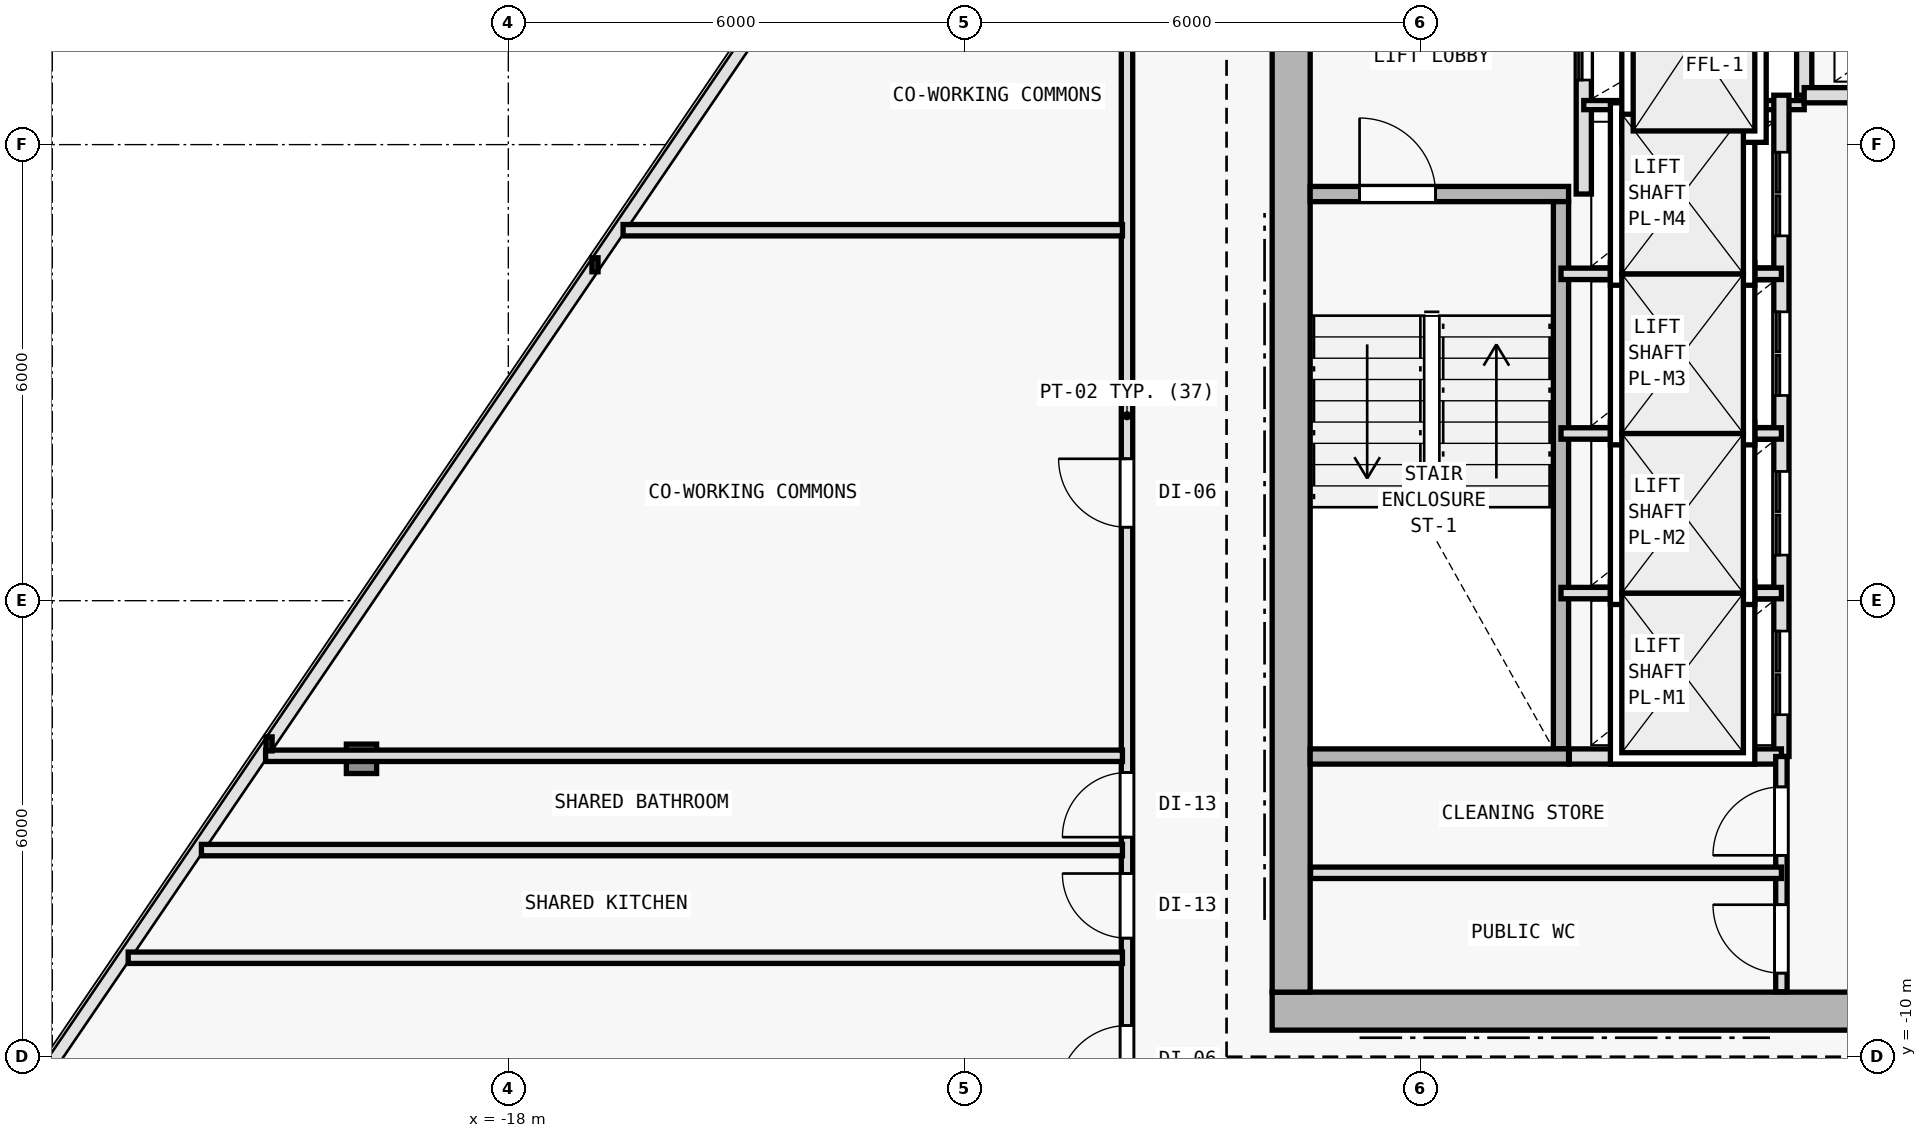
"""IFC4 building model, lengths in metres.
Left out: names, types, materials, properties, quantities, classifications, styles, units other than length and angle.
Written with IfcOpenShell. Run it as: python <this file> out.ifc"""

import sys

from ifc_helpers import new_model, si_unit, direction, frame, frame_2d, origin, origin_2d, place, context, subcontext, project, spatial, rectangle, i_section, extrude, element, fill, save


model = new_model("IFC4")
c1 = context("Model", 3, precision=1e-05, world=origin(), true_north=direction((0.0, 1.0)))
c2 = subcontext(c1, "Body", "Model", "MODEL_VIEW")
j1 = project(units=[si_unit("LENGTHUNIT", "METRE"), si_unit("PLANEANGLEUNIT", "RADIAN")], contexts=[c1])
p1 = place(None, origin())
s1 = spatial("IfcSite", under=j1, at=p1, CompositionType="ELEMENT")
p2 = place(p1, origin())
s2 = spatial("IfcBuilding", under=s1, at=p2, CompositionType="ELEMENT")
p3 = place(p2, frame((0.0, 0.0, 209.1)))
s3 = spatial("IfcBuildingStorey", under=s2, at=p3, CompositionType="ELEMENT", Elevation=209.1)
for number, where, z_axis, x_axis in (
    (1, (-7.7, -9.4, 0.0), (0.0, 0.0, 1.0), (1.0, 0.0, 0.0)),
    (2, (-7.7, 2.0, 0.0), (0.0, 0.0, 1.0), (1.0, 0.0, 0.0)),
):
    element("IfcColumn", number, at=place(p3, frame(where, z_axis=z_axis, x_axis=x_axis)), inside=s3, PredefinedType="COLUMN", context=c2, shape_type="SweptSolid", body=[
        extrude(i_section(OverallWidth=0.398, OverallDepth=0.387, WebThickness=0.013, FlangeThickness=0.022, FilletRadius=0.015, at=origin_2d()), origin(), (0.0, 0.0, 1.0), 3.6),
    ])
p4 = place(p3, frame((-19.932, -6.08, 0.005), z_axis=(0.02590150246, 0.022230423371, 0.999417290448), x_axis=(-0.65128330188, 0.758834672832, 0.0)))
e3 = element("IfcColumn", 3, at=p4, inside=s3, PredefinedType="COLUMN", context=c2, shape_type="SweptSolid", body=[
    extrude(i_section(OverallWidth=0.398, OverallDepth=0.387, WebThickness=0.013, FlangeThickness=0.022, FilletRadius=0.015, at=origin_2d()), origin(), (0.0, 0.0, 1.0), 3.591),
])
p5 = place(p3, frame((-7.95, -9.4, 0.0), z_axis=(0.0, 0.0, 1.0), x_axis=(1.0, 0.0, 0.0)))
e4 = element("IfcWall", 4, at=p5, inside=s3, PredefinedType="SHEAR", context=c2, shape_type="SweptSolid", body=[
    extrude(rectangle(XDim=15.9, YDim=0.5, at=frame_2d((7.95, 0.0))), origin(), (0.0, 0.0, 1.0), 3.35),
])
p6 = place(p5, frame((9.6, 0.0, 0.0)))
e5 = element("IfcOpeningElement", 5, at=p6, cuts=e4, PredefinedType="OPENING", context=c2, shape_type="SweptSolid", body=[
    extrude(rectangle(XDim=1.5, YDim=2.2, at=frame_2d((0.75, 1.1))), frame((0.0, 0.26, 0.0), z_axis=(0.0, -1.0, 0.0), x_axis=(1.0, 0.0, 0.0)), (0.0, 0.0, 1.0), 0.52),
])
p7 = place(p3, frame((-7.7, -9.15, 0.0), z_axis=(0.0, 0.0, 1.0), x_axis=(0.0, 1.0, 0.0)))
e6 = element("IfcWall", 6, at=p7, inside=s3, PredefinedType="SHEAR", context=c2, shape_type="SweptSolid", body=[
    extrude(rectangle(XDim=19.1, YDim=0.5, at=frame_2d((9.55, 0.0))), origin(), (0.0, 0.0, 1.0), 3.35),
])
p8 = place(p7, frame((12.7, 0.0, 0.0)))
e7 = element("IfcOpeningElement", 7, at=p8, cuts=e6, PredefinedType="OPENING", context=c2, shape_type="SweptSolid", body=[
    extrude(rectangle(XDim=1.1, YDim=2.15, at=frame_2d((0.55, 1.075))), frame((0.0, 0.26, 0.0), z_axis=(0.0, -1.0, 0.0), x_axis=(1.0, 0.0, 0.0)), (0.0, 0.0, 1.0), 0.52),
])
p9 = place(p3, frame((-7.45, 1.35, 0.0), z_axis=(0.0, 0.0, 1.0), x_axis=(1.0, 0.0, 0.0)))
e8 = element("IfcWall", 8, at=p9, inside=s3, PredefinedType="SOLIDWALL", context=c2, shape_type="SweptSolid", body=[
    extrude(rectangle(XDim=3.4, YDim=0.2, at=frame_2d((1.7, 0.0))), origin(), (0.0, 0.0, 1.0), 3.35),
])
p10 = place(p9, frame((0.65, 0.0, 0.0)))
e9 = element("IfcOpeningElement", 9, at=p10, cuts=e8, PredefinedType="OPENING", context=c2, shape_type="SweptSolid", body=[
    extrude(rectangle(XDim=1.0, YDim=2.15, at=frame_2d((0.5, 1.075))), frame((0.0, 0.11, 0.0), z_axis=(0.0, -1.0, 0.0), x_axis=(1.0, 0.0, 0.0)), (0.0, 0.0, 1.0), 0.22),
])
p11 = place(p3, frame((-4.15, -5.95, 0.0), z_axis=(0.0, 0.0, 1.0), x_axis=(0.0, 1.0, 0.0)))
e10 = element("IfcWall", 10, at=p11, inside=s3, PredefinedType="SOLIDWALL", context=c2, shape_type="SweptSolid", body=[
    extrude(rectangle(XDim=7.2, YDim=0.2, at=frame_2d((3.6, 0.0))), origin(), (0.0, 0.0, 1.0), 3.35),
])
p12 = place(p3, frame((-3.85, 1.35, 0.0), z_axis=(0.0, 0.0, 1.0), x_axis=(0.0, 1.0, 0.0)))
e11 = element("IfcWall", 11, at=p12, inside=s3, PredefinedType="SOLIDWALL", context=c2, shape_type="SweptSolid", body=[
    extrude(rectangle(XDim=8.595, YDim=0.2, at=frame_2d((4.297, 0.0))), origin(), (0.0, 0.0, 1.0), 3.35),
])
p13 = place(p12, frame((1.5, 0.0, 0.0)))
e12 = element("IfcOpeningElement", 12, at=p13, cuts=e11, PredefinedType="OPENING", context=c2, shape_type="SweptSolid", body=[
    extrude(rectangle(XDim=1.0, YDim=2.15, at=frame_2d((0.5, 1.075))), frame((0.0, 0.11, 0.0), z_axis=(0.0, -1.0, 0.0), x_axis=(1.0, 0.0, 0.0)), (0.0, 0.0, 1.0), 0.22),
])
p14 = place(p12, frame((3.18, 0.0, 0.0)))
e13 = element("IfcOpeningElement", 13, at=p14, cuts=e11, PredefinedType="OPENING", context=c2, shape_type="SweptSolid", body=[
    extrude(rectangle(XDim=1.0, YDim=2.15, at=frame_2d((0.5, 1.075))), frame((0.0, 0.11, 0.0), z_axis=(0.0, -1.0, 0.0), x_axis=(1.0, 0.0, 0.0)), (0.0, 0.0, 1.0), 0.22),
])
p15 = place(p3, frame((-0.95, 2.65, 0.0), z_axis=(0.0, 0.0, 1.0), x_axis=(0.0, 1.0, 0.0)))
e14 = element("IfcWall", 14, at=p15, inside=s3, PredefinedType="SOLIDWALL", context=c2, shape_type="SweptSolid", body=[
    extrude(rectangle(XDim=3.27, YDim=0.2, at=frame_2d((1.635, 0.0))), origin(), (0.0, 0.0, 1.0), 3.35),
])
p16 = place(p3, frame((-3.85, 2.52, 0.0), z_axis=(0.0, 0.0, 1.0), x_axis=(1.0, 0.0, 0.0)))
e15 = element("IfcWall", 15, at=p16, inside=s3, PredefinedType="PARTITIONING", context=c2, shape_type="SweptSolid", body=[
    extrude(rectangle(XDim=2.9, YDim=0.12, at=frame_2d((1.45, 0.0))), origin(), (0.0, 0.0, 1.0), 3.35),
])
p17 = place(p3, frame((-1.25, -6.05, 0.0), z_axis=(0.0, 0.0, 1.0), x_axis=(0.0, 1.0, 0.0)))
e16 = element("IfcWall", 16, at=p17, inside=s3, PredefinedType="SOLIDWALL", context=c2, shape_type="SweptSolid", body=[
    extrude(rectangle(XDim=8.7, YDim=0.2, at=frame_2d((4.35, 0.0))), origin(), (0.0, 0.0, 1.0), 3.35),
])
p18 = place(p17, frame((0.55, 0.0, 0.0)))
e17 = element("IfcOpeningElement", 17, at=p18, cuts=e16, PredefinedType="OPENING", context=c2, shape_type="SweptSolid", body=[
    extrude(rectangle(XDim=1.1, YDim=2.15, at=frame_2d((0.55, 1.075))), frame((0.0, 0.11, 0.0), z_axis=(0.0, -1.0, 0.0), x_axis=(1.0, 0.0, 0.0)), (0.0, 0.0, 1.0), 0.22),
])
p19 = place(p17, frame((2.65, 0.0, 0.0)))
e18 = element("IfcOpeningElement", 18, at=p19, cuts=e16, PredefinedType="OPENING", context=c2, shape_type="SweptSolid", body=[
    extrude(rectangle(XDim=1.1, YDim=2.15, at=frame_2d((0.55, 1.075))), frame((0.0, 0.11, 0.0), z_axis=(0.0, -1.0, 0.0), x_axis=(1.0, 0.0, 0.0)), (0.0, 0.0, 1.0), 0.22),
])
p20 = place(p17, frame((4.75, 0.0, 0.0)))
e19 = element("IfcOpeningElement", 19, at=p20, cuts=e16, PredefinedType="OPENING", context=c2, shape_type="SweptSolid", body=[
    extrude(rectangle(XDim=1.1, YDim=2.15, at=frame_2d((0.55, 1.075))), frame((0.0, 0.11, 0.0), z_axis=(0.0, -1.0, 0.0), x_axis=(1.0, 0.0, 0.0)), (0.0, 0.0, 1.0), 0.22),
])
p21 = place(p17, frame((6.85, 0.0, 0.0)))
e20 = element("IfcOpeningElement", 20, at=p21, cuts=e16, PredefinedType="OPENING", context=c2, shape_type="SweptSolid", body=[
    extrude(rectangle(XDim=1.1, YDim=2.15, at=frame_2d((0.55, 1.075))), frame((0.0, 0.11, 0.0), z_axis=(0.0, -1.0, 0.0), x_axis=(1.0, 0.0, 0.0)), (0.0, 0.0, 1.0), 0.22),
])
for number, where, z_axis, x_axis in (
    (21, (-4.15, -3.9, 0.0), (0.0, 0.0, 1.0), (1.0, 0.0, 0.0)),
    (22, (-4.15, -1.8, 0.0), (0.0, 0.0, 1.0), (1.0, 0.0, 0.0)),
    (23, (-4.15, 0.3, 0.0), (0.0, 0.0, 1.0), (1.0, 0.0, 0.0)),
):
    element("IfcWall", number, at=place(p3, frame(where, z_axis=z_axis, x_axis=x_axis)), inside=s3, PredefinedType="PARTITIONING", context=c2, shape_type="SweptSolid", body=[
        extrude(rectangle(XDim=2.9, YDim=0.15, at=frame_2d((1.45, 0.0))), origin(), (0.0, 0.0, 1.0), 3.35),
    ])
p22 = place(p3, frame((-0.95, 2.65, 0.0), z_axis=(0.0, 0.0, 1.0), x_axis=(1.0, 0.0, 0.0)))
e24 = element("IfcWall", 24, at=p22, inside=s3, PredefinedType="SOLIDWALL", context=c2, shape_type="SweptSolid", body=[
    extrude(rectangle(XDim=2.9, YDim=0.2, at=frame_2d((1.45, 0.0))), origin(), (0.0, 0.0, 1.0), 3.35),
])
p23 = place(p3, frame((-7.45, -6.05, 0.0), z_axis=(0.0, 0.0, 1.0), x_axis=(1.0, 0.0, 0.0)))
e25 = element("IfcWall", 25, at=p23, inside=s3, PredefinedType="SOLIDWALL", context=c2, shape_type="SweptSolid", body=[
    extrude(rectangle(XDim=3.4, YDim=0.2, at=frame_2d((1.7, 0.0))), origin(), (0.0, 0.0, 1.0), 3.35),
])
p24 = place(p3, frame((-4.04, -6.05, 0.0), z_axis=(0.0, 0.0, 1.0), x_axis=(1.0, 0.0, 0.0)))
e26 = element("IfcWall", 26, at=p24, inside=s3, PredefinedType="SOLIDWALL", context=c2, shape_type="SweptSolid", body=[
    extrude(rectangle(XDim=2.79, YDim=0.2, at=frame_2d((1.395, 0.0))), origin(), (0.0, 0.0, 1.0), 3.35),
])
p25 = place(p3, frame((-1.25, -9.145, 0.0), z_axis=(0.0, 0.0, 1.0), x_axis=(0.0, 1.0, 0.0)))
e27 = element("IfcWall", 27, at=p25, inside=s3, PredefinedType="PARTITIONING", context=c2, shape_type="SweptSolid", body=[
    extrude(rectangle(XDim=3.095, YDim=0.15, at=frame_2d((1.547, 0.0))), origin(), (0.0, 0.0, 1.0), 3.35),
])
p26 = place(p25, frame((1.795, 0.0, 0.0)))
e28 = element("IfcOpeningElement", 28, at=p26, cuts=e27, PredefinedType="OPENING", context=c2, shape_type="SweptSolid", body=[
    extrude(rectangle(XDim=0.9, YDim=2.1, at=frame_2d((0.45, 1.05))), frame((0.0, 0.085, 0.0), z_axis=(0.0, -1.0, 0.0), x_axis=(1.0, 0.0, 0.0)), (0.0, 0.0, 1.0), 0.17),
])
p27 = place(p25, frame((0.245, 0.0, 0.0)))
e29 = element("IfcOpeningElement", 29, at=p27, cuts=e27, PredefinedType="OPENING", context=c2, shape_type="SweptSolid", body=[
    extrude(rectangle(XDim=0.9, YDim=2.1, at=frame_2d((0.45, 1.05))), frame((0.0, 0.085, 0.0), z_axis=(0.0, -1.0, 0.0), x_axis=(1.0, 0.0, 0.0)), (0.0, 0.0, 1.0), 0.17),
])
p28 = place(p3, frame((-7.445, -7.58, 0.0), z_axis=(0.0, 0.0, 1.0), x_axis=(1.0, 0.0, 0.0)))
e30 = element("IfcWall", 30, at=p28, inside=s3, PredefinedType="PARTITIONING", context=c2, shape_type="SweptSolid", body=[
    extrude(rectangle(XDim=6.195, YDim=0.15, at=frame_2d((3.098, 0.0))), origin(), (0.0, 0.0, 1.0), 3.35),
])
p29 = place(p3, frame((-9.86, -11.56, 0.0), z_axis=(0.0, 0.0, 1.0), x_axis=(0.0, 1.0, 0.0)))
e31 = element("IfcWall", 31, at=p29, inside=s3, PredefinedType="PARTITIONING", context=c2, shape_type="SweptSolid", body=[
    extrude(rectangle(XDim=19.986, YDim=0.15, at=frame_2d((9.993, 0.0))), origin(), (0.0, 0.0, 1.0), 2.825),
])
p30 = place(p29, frame((8.527, 0.0, 0.0)))
e32 = element("IfcOpeningElement", 32, at=p30, cuts=e31, PredefinedType="OPENING", context=c2, shape_type="SweptSolid", body=[
    extrude(rectangle(XDim=0.9, YDim=2.1, at=frame_2d((0.45, 1.05))), frame((0.0, 0.085, 0.0), z_axis=(0.0, -1.0, 0.0), x_axis=(1.0, 0.0, 0.0)), (0.0, 0.0, 1.0), 0.17),
])
p31 = place(p29, frame((4.449, 0.0, 0.0)))
e33 = element("IfcOpeningElement", 33, at=p31, cuts=e31, PredefinedType="OPENING", context=c2, shape_type="SweptSolid", body=[
    extrude(rectangle(XDim=0.85, YDim=2.1, at=frame_2d((0.425, 1.05))), frame((0.0, 0.085, 0.0), z_axis=(0.0, -1.0, 0.0), x_axis=(1.0, 0.0, 0.0)), (0.0, 0.0, 1.0), 0.17),
])
p32 = place(p29, frame((3.121, 0.0, 0.0)))
e34 = element("IfcOpeningElement", 34, at=p32, cuts=e31, PredefinedType="OPENING", context=c2, shape_type="SweptSolid", body=[
    extrude(rectangle(XDim=0.85, YDim=2.1, at=frame_2d((0.425, 1.05))), frame((0.0, 0.085, 0.0), z_axis=(0.0, -1.0, 0.0), x_axis=(1.0, 0.0, 0.0)), (0.0, 0.0, 1.0), 0.17),
])
p33 = place(p29, frame((1.07, 0.0, 0.0)))
e35 = element("IfcOpeningElement", 35, at=p33, cuts=e31, PredefinedType="OPENING", context=c2, shape_type="SweptSolid", body=[
    extrude(rectangle(XDim=0.9, YDim=2.1, at=frame_2d((0.45, 1.05))), frame((0.0, 0.085, 0.0), z_axis=(0.0, -1.0, 0.0), x_axis=(1.0, 0.0, 0.0)), (0.0, 0.0, 1.0), 0.17),
])
p34 = place(p29, frame((15.671, 0.0, 0.0)))
e36 = element("IfcOpeningElement", 36, at=p34, cuts=e31, PredefinedType="OPENING", context=c2, shape_type="SweptSolid", body=[
    extrude(rectangle(XDim=0.9, YDim=2.1, at=frame_2d((0.45, 1.05))), frame((0.0, 0.085, 0.0), z_axis=(0.0, -1.0, 0.0), x_axis=(1.0, 0.0, 0.0)), (0.0, 0.0, 1.0), 0.17),
])
p35 = place(p3, frame((-9.92, -6.041, 0.0), z_axis=(0.0, 0.0, 1.0), x_axis=(-1.0, 0.0, 0.0)))
e37 = element("IfcWall", 37, at=p35, inside=s3, PredefinedType="PARTITIONING", context=c2, shape_type="SweptSolid", body=[
    extrude(rectangle(XDim=11.274, YDim=0.15, at=frame_2d((5.637, 0.0))), origin(), (0.0, 0.0, 1.0), 2.825),
])
p36 = place(p3, frame((-9.92, -8.698, 0.0), z_axis=(0.0, 0.0, 1.0), x_axis=(-1.0, 0.0, 0.0)))
e38 = element("IfcWall", 38, at=p36, inside=s3, PredefinedType="PARTITIONING", context=c2, shape_type="SweptSolid", body=[
    extrude(rectangle(XDim=13.081, YDim=0.15, at=frame_2d((6.541, 0.0))), origin(), (0.0, 0.0, 1.0), 2.825),
])
p37 = place(p3, frame((-9.92, -7.281, 0.0), z_axis=(0.0, 0.0, 1.0), x_axis=(-1.0, 0.0, 0.0)))
e39 = element("IfcWall", 39, at=p37, inside=s3, PredefinedType="PARTITIONING", context=c2, shape_type="SweptSolid", body=[
    extrude(rectangle(XDim=12.118, YDim=0.15, at=frame_2d((6.059, 0.0))), origin(), (0.0, 0.0, 1.0), 2.825),
])
p38 = place(p3, frame((-9.92, 0.874, 0.0), z_axis=(0.0, 0.0, 1.0), x_axis=(-1.0, 0.0, 0.0)))
e40 = element("IfcWall", 40, at=p38, inside=s3, PredefinedType="PARTITIONING", context=c2, shape_type="SweptSolid", body=[
    extrude(rectangle(XDim=6.57, YDim=0.15, at=frame_2d((3.285, 0.0))), origin(), (0.0, 0.0, 1.0), 2.825),
])
p39 = place(p10, origin())
e41 = element("IfcDoor", 41, at=p39, inside=s3, OperationType="SINGLE_SWING_LEFT", PredefinedType="DOOR", context=c2, shape_type="SweptSolid", body=[
    extrude(rectangle(XDim=1.0, YDim=2.15, at=frame_2d((0.5, 1.075))), frame((0.0, 0.025, 0.0), z_axis=(0.0, -1.0, 0.0), x_axis=(1.0, 0.0, 0.0)), (0.0, 0.0, 1.0), 0.05),
])
fill(e9, e41)
p40 = place(p18, origin())
e42 = element("IfcDoor", 42, at=p40, inside=s3, OperationType="DOUBLE_DOOR_SLIDING", PredefinedType="DOOR", context=c2, shape_type="SweptSolid", body=[
    extrude(rectangle(XDim=1.1, YDim=2.15, at=frame_2d((0.55, 1.075))), frame((0.0, 0.025, 0.0), z_axis=(0.0, -1.0, 0.0), x_axis=(1.0, 0.0, 0.0)), (0.0, 0.0, 1.0), 0.05),
])
fill(e17, e42)
p41 = place(p19, origin())
e43 = element("IfcDoor", 43, at=p41, inside=s3, OperationType="DOUBLE_DOOR_SLIDING", PredefinedType="DOOR", context=c2, shape_type="SweptSolid", body=[
    extrude(rectangle(XDim=1.1, YDim=2.15, at=frame_2d((0.55, 1.075))), frame((0.0, 0.025, 0.0), z_axis=(0.0, -1.0, 0.0), x_axis=(1.0, 0.0, 0.0)), (0.0, 0.0, 1.0), 0.05),
])
fill(e18, e43)
p42 = place(p20, origin())
e44 = element("IfcDoor", 44, at=p42, inside=s3, OperationType="DOUBLE_DOOR_SLIDING", PredefinedType="DOOR", context=c2, shape_type="SweptSolid", body=[
    extrude(rectangle(XDim=1.1, YDim=2.15, at=frame_2d((0.55, 1.075))), frame((0.0, 0.025, 0.0), z_axis=(0.0, -1.0, 0.0), x_axis=(1.0, 0.0, 0.0)), (0.0, 0.0, 1.0), 0.05),
])
fill(e19, e44)
p43 = place(p21, origin())
e45 = element("IfcDoor", 45, at=p43, inside=s3, OperationType="DOUBLE_DOOR_SLIDING", PredefinedType="DOOR", context=c2, shape_type="SweptSolid", body=[
    extrude(rectangle(XDim=1.1, YDim=2.15, at=frame_2d((0.55, 1.075))), frame((0.0, 0.025, 0.0), z_axis=(0.0, -1.0, 0.0), x_axis=(1.0, 0.0, 0.0)), (0.0, 0.0, 1.0), 0.05),
])
fill(e20, e45)
p44 = place(p13, origin())
e46 = element("IfcDoor", 46, at=p44, inside=s3, OperationType="DOUBLE_DOOR_SLIDING", PredefinedType="DOOR", context=c2, shape_type="SweptSolid", body=[
    extrude(rectangle(XDim=1.0, YDim=2.15, at=frame_2d((0.5, 1.075))), frame((0.0, 0.025, 0.0), z_axis=(0.0, -1.0, 0.0), x_axis=(1.0, 0.0, 0.0)), (0.0, 0.0, 1.0), 0.05),
])
fill(e12, e46)
p45 = place(p26, origin())
e47 = element("IfcDoor", 47, at=p45, inside=s3, OperationType="SINGLE_SWING_LEFT", PredefinedType="DOOR", context=c2, shape_type="SweptSolid", body=[
    extrude(rectangle(XDim=0.9, YDim=2.1, at=frame_2d((0.45, 1.05))), frame((0.0, 0.025, 0.0), z_axis=(0.0, -1.0, 0.0), x_axis=(1.0, 0.0, 0.0)), (0.0, 0.0, 1.0), 0.05),
])
fill(e28, e47)
p46 = place(p27, origin())
e48 = element("IfcDoor", 48, at=p46, inside=s3, OperationType="SINGLE_SWING_RIGHT", PredefinedType="DOOR", context=c2, shape_type="SweptSolid", body=[
    extrude(rectangle(XDim=0.9, YDim=2.1, at=frame_2d((0.45, 1.05))), frame((0.0, 0.025, 0.0), z_axis=(0.0, -1.0, 0.0), x_axis=(1.0, 0.0, 0.0)), (0.0, 0.0, 1.0), 0.05),
])
fill(e29, e48)
p47 = place(p30, origin())
e49 = element("IfcDoor", 49, at=p47, inside=s3, OperationType="SINGLE_SWING_RIGHT", PredefinedType="DOOR", context=c2, shape_type="SweptSolid", body=[
    extrude(rectangle(XDim=0.9, YDim=2.1, at=frame_2d((0.45, 1.05))), frame((0.0, 0.025, 0.0), z_axis=(0.0, -1.0, 0.0), x_axis=(1.0, 0.0, 0.0)), (0.0, 0.0, 1.0), 0.05),
])
fill(e32, e49)
p48 = place(p31, origin())
e50 = element("IfcDoor", 50, at=p48, inside=s3, OperationType="SINGLE_SWING_LEFT", PredefinedType="DOOR", context=c2, shape_type="SweptSolid", body=[
    extrude(rectangle(XDim=0.85, YDim=2.1, at=frame_2d((0.425, 1.05))), frame((0.0, 0.025, 0.0), z_axis=(0.0, -1.0, 0.0), x_axis=(1.0, 0.0, 0.0)), (0.0, 0.0, 1.0), 0.05),
])
fill(e33, e50)
p49 = place(p32, origin())
e51 = element("IfcDoor", 51, at=p49, inside=s3, OperationType="SINGLE_SWING_RIGHT", PredefinedType="DOOR", context=c2, shape_type="SweptSolid", body=[
    extrude(rectangle(XDim=0.85, YDim=2.1, at=frame_2d((0.425, 1.05))), frame((0.0, 0.025, 0.0), z_axis=(0.0, -1.0, 0.0), x_axis=(1.0, 0.0, 0.0)), (0.0, 0.0, 1.0), 0.05),
])
fill(e34, e51)
p50 = place(p33, origin())
e52 = element("IfcDoor", 52, at=p50, inside=s3, OperationType="SINGLE_SWING_LEFT", PredefinedType="DOOR", context=c2, shape_type="SweptSolid", body=[
    extrude(rectangle(XDim=0.9, YDim=2.1, at=frame_2d((0.45, 1.05))), frame((0.0, 0.025, 0.0), z_axis=(0.0, -1.0, 0.0), x_axis=(1.0, 0.0, 0.0)), (0.0, 0.0, 1.0), 0.05),
])
fill(e35, e52)
save(model, sys.argv[1])
